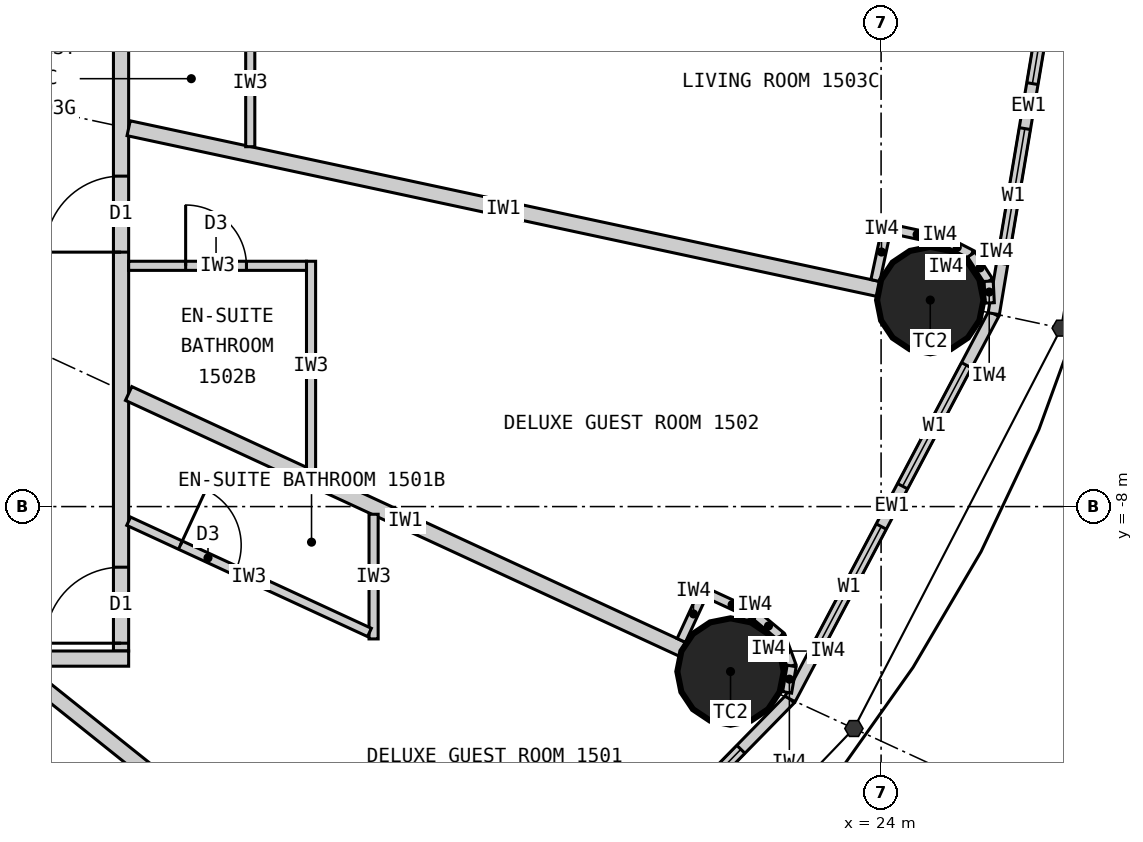
"""IFC4 building model, lengths in metres.
Left out: names, types, materials, properties, quantities, classifications, styles, units other than length and angle.
Written with IfcOpenShell. Run it as: python <this file> out.ifc"""

import sys

from ifc_helpers import new_model, si_unit, direction, frame, frame_2d, origin, origin_2d, place, context, subcontext, project, spatial, rectangle, circle, extrude, element, fill, save


model = new_model("IFC4")
c1 = context("Model", 3, precision=1e-05, world=origin(), true_north=direction((0.0, 1.0)))
c2 = subcontext(c1, "Body", "Model", "MODEL_VIEW")
j1 = project(units=[si_unit("LENGTHUNIT", "METRE"), si_unit("PLANEANGLEUNIT", "RADIAN")], contexts=[c1])
p1 = place(None, origin())
s1 = spatial("IfcSite", under=j1, at=p1, CompositionType="ELEMENT")
p2 = place(p1, origin())
s2 = spatial("IfcBuilding", under=s1, at=p2, CompositionType="ELEMENT")
p3 = place(p2, frame((0.0, 0.0, 63.9)))
s3 = spatial("IfcBuildingStorey", under=s2, at=p3, CompositionType="ELEMENT", Elevation=63.9)
for number, where, z_axis, x_axis in (
    (1, (22.019, -10.17, 0.0), (0.0, 0.0, 1.0), (1.0, 0.0, 0.0)),
    (2, (24.647, -5.283, 0.0), (0.0, 0.0, 1.0), (1.0, 0.0, 0.0)),
):
    element("IfcColumn", number, at=place(p3, frame(where, z_axis=z_axis, x_axis=x_axis)), inside=s3, PredefinedType="COLUMN", context=c2, shape_type="SweptSolid", body=[
        extrude(circle(Radius=0.7, at=origin_2d()), origin(), (0.0, 0.0, 1.0), 3.3),
    ])
p4 = place(p3, frame((18.57, -14.856, 0.0), z_axis=(0.0, 0.0, 1.0), x_axis=(0.699602905915, 0.714531856557, 0.0)))
e3 = element("IfcWall", 3, at=p4, inside=s3, PredefinedType="ELEMENTEDWALL", context=c2, shape_type="SweptSolid", body=[
    extrude(rectangle(XDim=6.051, YDim=0.15, at=frame_2d((3.025, 0.0))), origin(), (0.0, 0.0, 1.0), 3.12),
])
p5 = place(p4, frame((0.926, 0.0, 0.9)))
e4 = element("IfcOpeningElement", 4, at=p5, cuts=e3, PredefinedType="OPENING", context=c2, shape_type="SweptSolid", body=[
    extrude(rectangle(XDim=1.8, YDim=1.9, at=frame_2d((0.9, 0.95))), frame((0.0, 0.085, 0.0), z_axis=(0.0, -1.0, 0.0), x_axis=(1.0, 0.0, 0.0)), (0.0, 0.0, 1.0), 0.17),
])
p6 = place(p4, frame((3.325, 0.0, 0.9)))
e5 = element("IfcOpeningElement", 5, at=p6, cuts=e3, PredefinedType="OPENING", context=c2, shape_type="SweptSolid", body=[
    extrude(rectangle(XDim=1.8, YDim=1.9, at=frame_2d((0.9, 0.95))), frame((0.0, 0.085, 0.0), z_axis=(0.0, -1.0, 0.0), x_axis=(1.0, 0.0, 0.0)), (0.0, 0.0, 1.0), 0.17),
])
p7 = place(p3, frame((22.803, -10.532, 0.0), z_axis=(0.0, 0.0, 1.0), x_axis=(0.467296867008, 0.884100468321, 0.0)))
e6 = element("IfcWall", 6, at=p7, inside=s3, PredefinedType="ELEMENTEDWALL", context=c2, shape_type="SweptSolid", body=[
    extrude(rectangle(XDim=5.734, YDim=0.15, at=frame_2d((2.867, 0.0))), origin(), (0.0, 0.0, 1.0), 3.12),
])
p8 = place(p7, frame((0.767, 0.0, 0.9)))
e7 = element("IfcOpeningElement", 7, at=p8, cuts=e6, PredefinedType="OPENING", context=c2, shape_type="SweptSolid", body=[
    extrude(rectangle(XDim=1.8, YDim=1.9, at=frame_2d((0.9, 0.95))), frame((0.0, 0.085, 0.0), z_axis=(0.0, -1.0, 0.0), x_axis=(1.0, 0.0, 0.0)), (0.0, 0.0, 1.0), 0.17),
])
p9 = place(p7, frame((3.167, 0.0, 0.9)))
e8 = element("IfcOpeningElement", 8, at=p9, cuts=e6, PredefinedType="OPENING", context=c2, shape_type="SweptSolid", body=[
    extrude(rectangle(XDim=1.8, YDim=1.9, at=frame_2d((0.9, 0.95))), frame((0.0, 0.085, 0.0), z_axis=(0.0, -1.0, 0.0), x_axis=(1.0, 0.0, 0.0)), (0.0, 0.0, 1.0), 0.17),
])
p10 = place(p3, frame((25.482, -5.462, 0.0), z_axis=(0.0, 0.0, 1.0), x_axis=(0.165642551694, 0.986185857264, 0.0)))
e9 = element("IfcWall", 9, at=p10, inside=s3, PredefinedType="ELEMENTEDWALL", context=c2, shape_type="SweptSolid", body=[
    extrude(rectangle(XDim=5.539, YDim=0.15, at=frame_2d((2.77, 0.0))), origin(), (0.0, 0.0, 1.0), 3.12),
])
p11 = place(p10, frame((0.669, 0.0, 0.9)))
e10 = element("IfcOpeningElement", 10, at=p11, cuts=e9, PredefinedType="OPENING", context=c2, shape_type="SweptSolid", body=[
    extrude(rectangle(XDim=1.8, YDim=1.9, at=frame_2d((0.9, 0.95))), frame((0.0, 0.085, 0.0), z_axis=(0.0, -1.0, 0.0), x_axis=(1.0, 0.0, 0.0)), (0.0, 0.0, 1.0), 0.17),
])
p12 = place(p10, frame((3.07, 0.0, 0.9)))
e11 = element("IfcOpeningElement", 11, at=p12, cuts=e9, PredefinedType="OPENING", context=c2, shape_type="SweptSolid", body=[
    extrude(rectangle(XDim=1.8, YDim=1.9, at=frame_2d((0.9, 0.95))), frame((0.0, 0.085, 0.0), z_axis=(0.0, -1.0, 0.0), x_axis=(1.0, 0.0, 0.0)), (0.0, 0.0, 1.0), 0.17),
])
p13 = place(p3, frame((14.0, -9.9, 0.0), z_axis=(0.0, 0.0, 1.0), x_axis=(0.0, 1.0, 0.0)))
e12 = element("IfcWall", 12, at=p13, inside=s3, PredefinedType="PARTITIONING", context=c2, shape_type="SweptSolid", body=[
    extrude(rectangle(XDim=19.8, YDim=0.2, at=frame_2d((9.9, 0.0))), origin(), (0.0, 0.0, 1.0), 3.12),
])
p14 = place(p13, frame((0.103, 0.0, 0.0)))
e13 = element("IfcOpeningElement", 13, at=p14, cuts=e12, PredefinedType="OPENING", context=c2, shape_type="SweptSolid", body=[
    extrude(rectangle(XDim=1.0, YDim=2.2, at=frame_2d((0.5, 1.1))), frame((0.0, 0.11, 0.0), z_axis=(0.0, -1.0, 0.0), x_axis=(1.0, 0.0, 0.0)), (0.0, 0.0, 1.0), 0.22),
])
p15 = place(p13, frame((5.248, 0.0, 0.0)))
e14 = element("IfcOpeningElement", 14, at=p15, cuts=e12, PredefinedType="OPENING", context=c2, shape_type="SweptSolid", body=[
    extrude(rectangle(XDim=1.0, YDim=2.2, at=frame_2d((0.5, 1.1))), frame((0.0, 0.11, 0.0), z_axis=(0.0, -1.0, 0.0), x_axis=(1.0, 0.0, 0.0)), (0.0, 0.0, 1.0), 0.22),
])
p16 = place(p13, frame((8.438, 0.0, 0.0)))
e15 = element("IfcOpeningElement", 15, at=p16, cuts=e12, PredefinedType="OPENING", context=c2, shape_type="SweptSolid", body=[
    extrude(rectangle(XDim=1.0, YDim=2.2, at=frame_2d((0.5, 1.1))), frame((0.0, 0.11, 0.0), z_axis=(0.0, -1.0, 0.0), x_axis=(1.0, 0.0, 0.0)), (0.0, 0.0, 1.0), 0.22),
])
p17 = place(p13, frame((14.532, 0.0, 0.0)))
e16 = element("IfcOpeningElement", 16, at=p17, cuts=e12, PredefinedType="OPENING", context=c2, shape_type="SweptSolid", body=[
    extrude(rectangle(XDim=1.0, YDim=2.2, at=frame_2d((0.5, 1.1))), frame((0.0, 0.11, 0.0), z_axis=(0.0, -1.0, 0.0), x_axis=(1.0, 0.0, 0.0)), (0.0, 0.0, 1.0), 0.22),
])
p18 = place(p3, frame((14.1, -10.0, 0.0), z_axis=(0.0, 0.0, 1.0), x_axis=(-1.0, 0.0, 0.0)))
e17 = element("IfcWall", 17, at=p18, inside=s3, PredefinedType="PARTITIONING", context=c2, shape_type="SweptSolid", body=[
    extrude(rectangle(XDim=28.2, YDim=0.2, at=frame_2d((14.1, 0.0))), origin(), (0.0, 0.0, 1.0), 3.12),
])
p19 = place(p18, frame((23.865, 0.0, 0.0)))
e18 = element("IfcOpeningElement", 18, at=p19, cuts=e17, PredefinedType="OPENING", context=c2, shape_type="SweptSolid", body=[
    extrude(rectangle(XDim=1.0, YDim=2.2, at=frame_2d((0.5, 1.1))), frame((0.0, 0.11, 0.0), z_axis=(0.0, -1.0, 0.0), x_axis=(1.0, 0.0, 0.0)), (0.0, 0.0, 1.0), 0.22),
])
p20 = place(p18, frame((18.529, 0.0, 0.0)))
e19 = element("IfcOpeningElement", 19, at=p20, cuts=e17, PredefinedType="OPENING", context=c2, shape_type="SweptSolid", body=[
    extrude(rectangle(XDim=1.0, YDim=2.2, at=frame_2d((0.5, 1.1))), frame((0.0, 0.11, 0.0), z_axis=(0.0, -1.0, 0.0), x_axis=(1.0, 0.0, 0.0)), (0.0, 0.0, 1.0), 0.22),
])
p21 = place(p18, frame((14.623, 0.0, 0.0)))
e20 = element("IfcOpeningElement", 20, at=p21, cuts=e17, PredefinedType="OPENING", context=c2, shape_type="SweptSolid", body=[
    extrude(rectangle(XDim=1.0, YDim=2.2, at=frame_2d((0.5, 1.1))), frame((0.0, 0.11, 0.0), z_axis=(0.0, -1.0, 0.0), x_axis=(1.0, 0.0, 0.0)), (0.0, 0.0, 1.0), 0.22),
])
p22 = place(p18, frame((11.24, 0.0, 0.0)))
e21 = element("IfcOpeningElement", 21, at=p22, cuts=e17, PredefinedType="OPENING", context=c2, shape_type="SweptSolid", body=[
    extrude(rectangle(XDim=1.0, YDim=2.2, at=frame_2d((0.5, 1.1))), frame((0.0, 0.11, 0.0), z_axis=(0.0, -1.0, 0.0), x_axis=(1.0, 0.0, 0.0)), (0.0, 0.0, 1.0), 0.22),
])
p23 = place(p18, frame((8.671, 0.0, 0.0)))
e22 = element("IfcOpeningElement", 22, at=p23, cuts=e17, PredefinedType="OPENING", context=c2, shape_type="SweptSolid", body=[
    extrude(rectangle(XDim=1.0, YDim=2.2, at=frame_2d((0.5, 1.1))), frame((0.0, 0.11, 0.0), z_axis=(0.0, -1.0, 0.0), x_axis=(1.0, 0.0, 0.0)), (0.0, 0.0, 1.0), 0.22),
])
p24 = place(p18, frame((2.801, 0.0, 0.0)))
e23 = element("IfcOpeningElement", 23, at=p24, cuts=e17, PredefinedType="OPENING", context=c2, shape_type="SweptSolid", body=[
    extrude(rectangle(XDim=1.0, YDim=2.2, at=frame_2d((0.5, 1.1))), frame((0.0, 0.11, 0.0), z_axis=(0.0, -1.0, 0.0), x_axis=(1.0, 0.0, 0.0)), (0.0, 0.0, 1.0), 0.22),
])
p25 = place(p3, frame((12.625, -10.1, 0.0), z_axis=(0.0, 0.0, 1.0), x_axis=(0.780892451574, -0.624665493744, 0.0)))
e24 = element("IfcWall", 24, at=p25, inside=s3, PredefinedType="PARTITIONING", context=c2, shape_type="SweptSolid", body=[
    extrude(rectangle(XDim=6.045, YDim=0.2, at=frame_2d((3.022, 0.0))), origin(), (0.0, 0.0, 1.0), 2.32),
])
p26 = place(p3, frame((14.1, -6.512, 0.0), z_axis=(0.0, 0.0, 1.0), x_axis=(0.907832871056, -0.419332181247, 0.0)))
e25 = element("IfcWall", 25, at=p26, inside=s3, PredefinedType="PARTITIONING", context=c2, shape_type="SweptSolid", body=[
    extrude(rectangle(XDim=8.023, YDim=0.2, at=frame_2d((4.011, 0.0))), origin(), (0.0, 0.0, 1.0), 2.32),
])
p27 = place(p3, frame((14.1, -3.022, 0.0), z_axis=(0.0, 0.0, 1.0), x_axis=(0.977790014929, -0.209586943072, 0.0)))
e26 = element("IfcWall", 26, at=p27, inside=s3, PredefinedType="PARTITIONING", context=c2, shape_type="SweptSolid", body=[
    extrude(rectangle(XDim=10.087, YDim=0.2, at=frame_2d((5.043, 0.0))), origin(), (0.0, 0.0, 1.0), 2.32),
])
p28 = place(p3, frame((17.323, -8.101, 0.0), z_axis=(0.0, 0.0, 1.0), x_axis=(0.0, -1.0, 0.0)))
e27 = element("IfcWall", 27, at=p28, inside=s3, PredefinedType="PARTITIONING", context=c2, shape_type="SweptSolid", body=[
    extrude(rectangle(XDim=1.64, YDim=0.12, at=frame_2d((0.82, 0.0))), origin(), (0.0, 0.0, 1.0), 3.12),
])
p29 = place(p3, frame((14.1, -8.193, 0.0), z_axis=(0.0, 0.0, 1.0), x_axis=(0.907836493557, -0.419324338628, 0.0)))
e28 = element("IfcWall", 28, at=p29, inside=s3, PredefinedType="PARTITIONING", context=c2, shape_type="SweptSolid", body=[
    extrude(rectangle(XDim=3.49, YDim=0.12, at=frame_2d((1.745, 0.0))), origin(), (0.0, 0.0, 1.0), 3.12),
])
p30 = place(p29, frame((0.75, 0.0, 0.0)))
e29 = element("IfcOpeningElement", 29, at=p30, cuts=e28, PredefinedType="OPENING", context=c2, shape_type="SweptSolid", body=[
    extrude(rectangle(XDim=0.8, YDim=2.1, at=frame_2d((0.4, 1.05))), frame((0.0, 0.07, 0.0), z_axis=(0.0, -1.0, 0.0), x_axis=(1.0, 0.0, 0.0)), (0.0, 0.0, 1.0), 0.14),
])
p31 = place(p3, frame((16.5, -7.521, 0.0), z_axis=(0.0, 0.0, 1.0), x_axis=(0.0, 1.0, 0.0)))
e30 = element("IfcWall", 30, at=p31, inside=s3, PredefinedType="PARTITIONING", context=c2, shape_type="SweptSolid", body=[
    extrude(rectangle(XDim=2.749, YDim=0.12, at=frame_2d((1.374, 0.0))), origin(), (0.0, 0.0, 1.0), 3.12),
])
p32 = place(p3, frame((14.1, -4.833, 0.0), z_axis=(0.0, 0.0, 1.0), x_axis=(1.0, 0.0, 0.0)))
e31 = element("IfcWall", 31, at=p32, inside=s3, PredefinedType="PARTITIONING", context=c2, shape_type="SweptSolid", body=[
    extrude(rectangle(XDim=2.34, YDim=0.12, at=frame_2d((1.17, 0.0))), origin(), (0.0, 0.0, 1.0), 3.12),
])
p33 = place(p32, frame((0.75, 0.0, 0.0)))
e32 = element("IfcOpeningElement", 32, at=p33, cuts=e31, PredefinedType="OPENING", context=c2, shape_type="SweptSolid", body=[
    extrude(rectangle(XDim=0.8, YDim=2.1, at=frame_2d((0.4, 1.05))), frame((0.0, 0.07, 0.0), z_axis=(0.0, -1.0, 0.0), x_axis=(1.0, 0.0, 0.0)), (0.0, 0.0, 1.0), 0.14),
])
p34 = place(p3, frame((15.7, -3.265, 0.0), z_axis=(0.0, 0.0, 1.0), x_axis=(0.0, 1.0, 0.0)))
e33 = element("IfcWall", 33, at=p34, inside=s3, PredefinedType="PARTITIONING", context=c2, shape_type="SweptSolid", body=[
    extrude(rectangle(XDim=1.683, YDim=0.12, at=frame_2d((0.841, 0.0))), origin(), (0.0, 0.0, 1.0), 3.12),
])
p35 = place(p3, frame((21.371, -9.761, 0.0), z_axis=(0.0, 0.0, 1.0), x_axis=(0.419259891039, 0.907866258744, 0.0)))
e34 = element("IfcWall", 34, at=p35, inside=s3, PredefinedType="PARTITIONING", context=c2, shape_type="SweptSolid", body=[
    extrude(rectangle(XDim=0.768, YDim=0.12, at=frame_2d((0.384, 0.0))), origin(), (0.0, 0.0, 1.0), 3.12),
])
p36 = place(p3, frame((21.722, -9.144, 0.0), z_axis=(0.0, 0.0, 1.0), x_axis=(0.907877701396, -0.419235112208, 0.0)))
e35 = element("IfcWall", 35, at=p36, inside=s3, PredefinedType="PARTITIONING", context=c2, shape_type="SweptSolid", body=[
    extrude(rectangle(XDim=0.7, YDim=0.12, at=frame_2d((0.35, 0.0))), origin(), (0.0, 0.0, 1.0), 3.12),
])
p37 = place(p3, frame((22.358, -9.437, 0.0), z_axis=(0.0, 0.0, 1.0), x_axis=(0.768412687942, -0.639954639806, 0.0)))
e36 = element("IfcWall", 36, at=p37, inside=s3, PredefinedType="PARTITIONING", context=c2, shape_type="SweptSolid", body=[
    extrude(rectangle(XDim=0.418, YDim=0.12, at=frame_2d((0.209, 0.0))), origin(), (0.0, 0.0, 1.0), 3.12),
])
p38 = place(p3, frame((22.679, -9.705, 0.0), z_axis=(0.0, 0.0, 1.0), x_axis=(0.345164001646, -0.938542386879, 0.0)))
e37 = element("IfcWall", 37, at=p38, inside=s3, PredefinedType="PARTITIONING", context=c2, shape_type="SweptSolid", body=[
    extrude(rectangle(XDim=0.418, YDim=0.12, at=frame_2d((0.209, 0.0))), origin(), (0.0, 0.0, 1.0), 3.12),
])
p39 = place(p3, frame((22.823, -10.097, 0.0), z_axis=(0.0, 0.0, 1.0), x_axis=(-0.169674995186, -0.985500074079, 0.0)))
e38 = element("IfcWall", 38, at=p39, inside=s3, PredefinedType="PARTITIONING", context=c2, shape_type="SweptSolid", body=[
    extrude(rectangle(XDim=0.353, YDim=0.12, at=frame_2d((0.176, 0.0))), origin(), (0.0, 0.0, 1.0), 3.12),
])
p40 = place(p3, frame((23.925, -5.026, 0.0), z_axis=(0.0, 0.0, 1.0), x_axis=(0.209681192172, 0.977769808109, 0.0)))
e39 = element("IfcWall", 39, at=p40, inside=s3, PredefinedType="PARTITIONING", context=c2, shape_type="SweptSolid", body=[
    extrude(rectangle(XDim=0.767, YDim=0.12, at=frame_2d((0.384, 0.0))), origin(), (0.0, 0.0, 1.0), 3.12),
])
p41 = place(p3, frame((24.132, -4.347, 0.0), z_axis=(0.0, 0.0, 1.0), x_axis=(0.977776882509, -0.209648200638, 0.0)))
e40 = element("IfcWall", 40, at=p41, inside=s3, PredefinedType="PARTITIONING", context=c2, shape_type="SweptSolid", body=[
    extrude(rectangle(XDim=0.7, YDim=0.12, at=frame_2d((0.35, 0.0))), origin(), (0.0, 0.0, 1.0), 3.12),
])
for number, where, z_axis, x_axis in (
    (41, (24.816, -4.494, 0.0), (0.0, 0.0, 1.0), (0.89, -0.455, 0.0)),
    (42, (25.188, -4.684, 0.0), (0.0, 0.0, 1.0), (0.543, -0.84, 0.0)),
):
    element("IfcWall", number, at=place(p3, frame(where, z_axis=z_axis, x_axis=x_axis)), inside=s3, PredefinedType="PARTITIONING", context=c2, shape_type="SweptSolid", body=[
        extrude(rectangle(XDim=0.418, YDim=0.12, at=frame_2d((0.209, 0.0))), origin(), (0.0, 0.0, 1.0), 3.12),
    ])
p42 = place(p3, frame((25.416, -5.035, 0.0), z_axis=(0.0, 0.0, 1.0), x_axis=(0.050406329159, -0.998728793007, 0.0)))
e43 = element("IfcWall", 43, at=p42, inside=s3, PredefinedType="PARTITIONING", context=c2, shape_type="SweptSolid", body=[
    extrude(rectangle(XDim=0.286, YDim=0.12, at=frame_2d((0.143, 0.0))), origin(), (0.0, 0.0, 1.0), 3.12),
])
p43 = place(p6, origin())
e44 = element("IfcWindow", 44, at=p43, inside=s3, PartitioningType="SINGLE_PANEL", PredefinedType="WINDOW", context=c2, shape_type="SweptSolid", body=[
    extrude(rectangle(XDim=1.8, YDim=1.9, at=frame_2d((0.9, 0.95))), frame((0.0, 0.03, 0.0), z_axis=(0.0, -1.0, 0.0), x_axis=(1.0, 0.0, 0.0)), (0.0, 0.0, 1.0), 0.06),
])
fill(e5, e44)
p44 = place(p8, origin())
e45 = element("IfcWindow", 45, at=p44, inside=s3, PartitioningType="SINGLE_PANEL", PredefinedType="WINDOW", context=c2, shape_type="SweptSolid", body=[
    extrude(rectangle(XDim=1.8, YDim=1.9, at=frame_2d((0.9, 0.95))), frame((0.0, 0.03, 0.0), z_axis=(0.0, -1.0, 0.0), x_axis=(1.0, 0.0, 0.0)), (0.0, 0.0, 1.0), 0.06),
])
fill(e7, e45)
p45 = place(p9, origin())
e46 = element("IfcWindow", 46, at=p45, inside=s3, PartitioningType="SINGLE_PANEL", PredefinedType="WINDOW", context=c2, shape_type="SweptSolid", body=[
    extrude(rectangle(XDim=1.8, YDim=1.9, at=frame_2d((0.9, 0.95))), frame((0.0, 0.03, 0.0), z_axis=(0.0, -1.0, 0.0), x_axis=(1.0, 0.0, 0.0)), (0.0, 0.0, 1.0), 0.06),
])
fill(e8, e46)
p46 = place(p11, origin())
e47 = element("IfcWindow", 47, at=p46, inside=s3, PartitioningType="SINGLE_PANEL", PredefinedType="WINDOW", context=c2, shape_type="SweptSolid", body=[
    extrude(rectangle(XDim=1.8, YDim=1.9, at=frame_2d((0.9, 0.95))), frame((0.0, 0.03, 0.0), z_axis=(0.0, -1.0, 0.0), x_axis=(1.0, 0.0, 0.0)), (0.0, 0.0, 1.0), 0.06),
])
fill(e10, e47)
p47 = place(p12, origin())
e48 = element("IfcWindow", 48, at=p47, inside=s3, PartitioningType="SINGLE_PANEL", PredefinedType="WINDOW", context=c2, shape_type="SweptSolid", body=[
    extrude(rectangle(XDim=1.8, YDim=1.9, at=frame_2d((0.9, 0.95))), frame((0.0, 0.03, 0.0), z_axis=(0.0, -1.0, 0.0), x_axis=(1.0, 0.0, 0.0)), (0.0, 0.0, 1.0), 0.06),
])
fill(e11, e48)
p48 = place(p30, origin())
e49 = element("IfcDoor", 49, at=p48, inside=s3, OperationType="SINGLE_SWING_LEFT", PredefinedType="DOOR", context=c2, shape_type="SweptSolid", body=[
    extrude(rectangle(XDim=0.8, YDim=2.1, at=frame_2d((0.4, 1.05))), frame((0.0, 0.025, 0.0), z_axis=(0.0, -1.0, 0.0), x_axis=(1.0, 0.0, 0.0)), (0.0, 0.0, 1.0), 0.05),
])
fill(e29, e49)
p49 = place(p14, origin())
e50 = element("IfcDoor", 50, at=p49, inside=s3, OperationType="SINGLE_SWING_LEFT", PredefinedType="DOOR", context=c2, shape_type="SweptSolid", body=[
    extrude(rectangle(XDim=1.0, YDim=2.2, at=frame_2d((0.5, 1.1))), frame((0.0, 0.025, 0.0), z_axis=(0.0, -1.0, 0.0), x_axis=(1.0, 0.0, 0.0)), (0.0, 0.0, 1.0), 0.05),
])
fill(e13, e50)
p50 = place(p33, origin())
e51 = element("IfcDoor", 51, at=p50, inside=s3, OperationType="SINGLE_SWING_LEFT", PredefinedType="DOOR", context=c2, shape_type="SweptSolid", body=[
    extrude(rectangle(XDim=0.8, YDim=2.1, at=frame_2d((0.4, 1.05))), frame((0.0, 0.025, 0.0), z_axis=(0.0, -1.0, 0.0), x_axis=(1.0, 0.0, 0.0)), (0.0, 0.0, 1.0), 0.05),
])
fill(e32, e51)
p51 = place(p15, origin())
e52 = element("IfcDoor", 52, at=p51, inside=s3, OperationType="SINGLE_SWING_LEFT", PredefinedType="DOOR", context=c2, shape_type="SweptSolid", body=[
    extrude(rectangle(XDim=1.0, YDim=2.2, at=frame_2d((0.5, 1.1))), frame((0.0, 0.025, 0.0), z_axis=(0.0, -1.0, 0.0), x_axis=(1.0, 0.0, 0.0)), (0.0, 0.0, 1.0), 0.05),
])
fill(e14, e52)
save(model, sys.argv[1])
